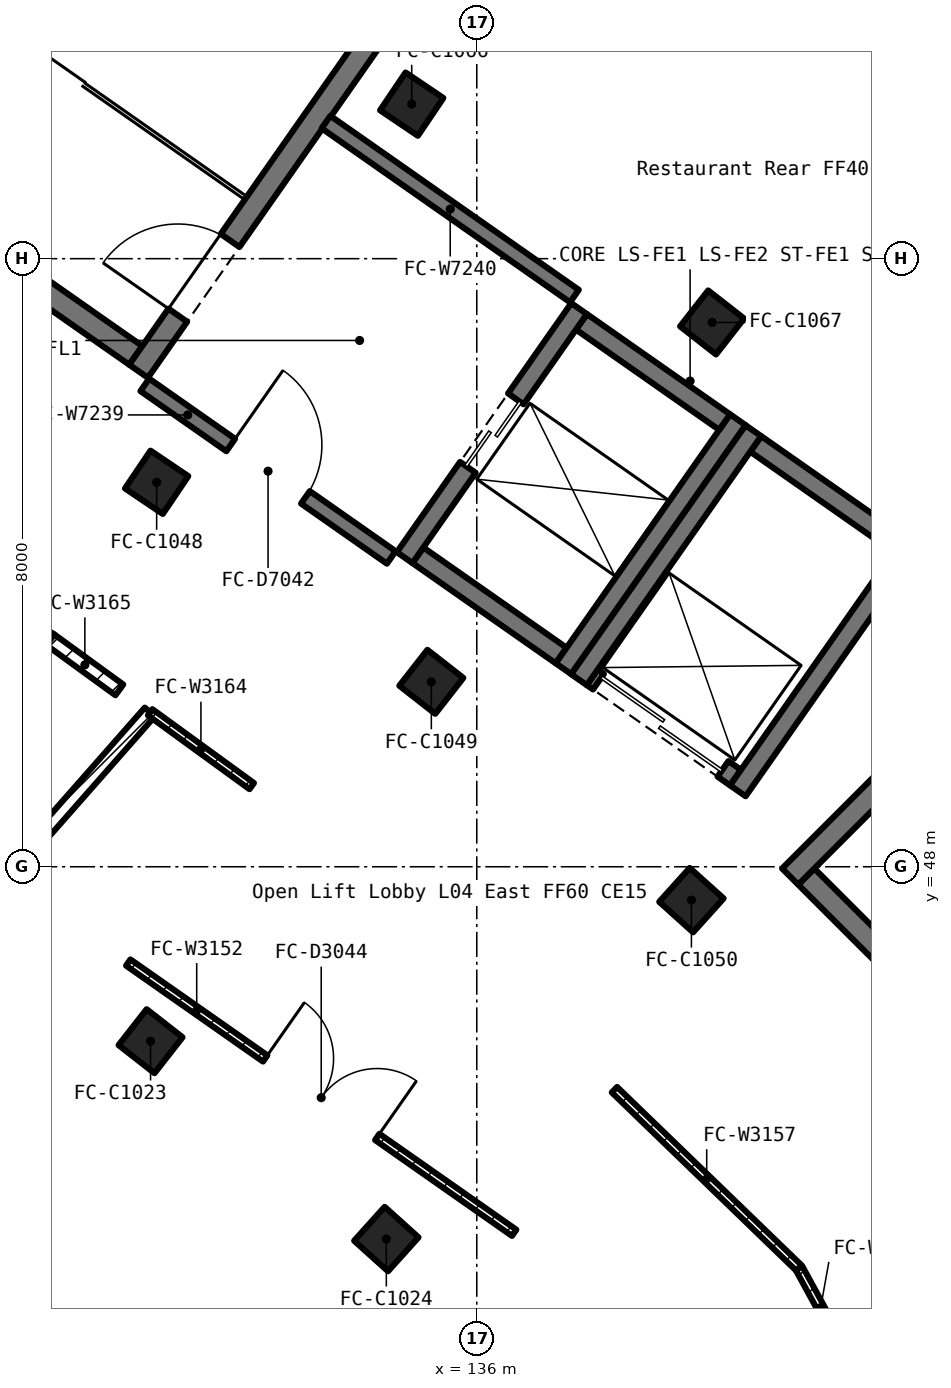
"""IFC4 building model, lengths in metres.
Left out: names, types, materials, properties, quantities, classifications, styles, units other than length and angle.
Written with IfcOpenShell. Run it as: python <this file> out.ifc"""

import sys

from ifc_helpers import new_model, si_unit, direction, frame, frame_2d, origin, origin_2d, place, context, subcontext, project, spatial, rectangle, extrude, element, fill, save


model = new_model("IFC4")
c1 = context("Model", 3, precision=1e-05, world=origin(), true_north=direction((0.0, 1.0)))
c2 = subcontext(c1, "Body", "Model", "MODEL_VIEW")
j1 = project(units=[si_unit("LENGTHUNIT", "METRE"), si_unit("PLANEANGLEUNIT", "RADIAN")], contexts=[c1])
p1 = place(None, origin())
s1 = spatial("IfcSite", under=j1, at=p1, CompositionType="ELEMENT")
p2 = place(p1, origin())
s2 = spatial("IfcBuilding", under=s1, at=p2, CompositionType="ELEMENT")
p3 = place(p2, frame((0.0, 0.0, 22.5)))
s3 = spatial("IfcBuildingStorey", under=s2, at=p3, CompositionType="ELEMENT", Elevation=22.5)
for number, where, z_axis, x_axis in (
    (1, (131.708, 45.705, 0.0), (0.0, 0.0, 1.0), (0.788, -0.616, 0.0)),
    (2, (134.81, 43.102, 0.0), (0.0, 0.0, 1.0), (0.743, -0.669, 0.0)),
    (3, (131.788, 53.058, 0.0), (0.0, 0.0, 1.0), (0.829, -0.559, 0.0)),
    (4, (135.402, 50.433, 0.0), (0.0, 0.0, 1.0), (0.788, -0.616, 0.0)),
    (5, (138.824, 47.561, 0.0), (0.0, 0.0, 1.0), (0.743, -0.669, 0.0)),
    (6, (135.144, 58.033, 0.0), (0.0, 0.0, 1.0), (0.829, -0.559, 0.0)),
    (7, (139.096, 55.161, 0.0), (0.0, 0.0, 1.0), (0.788, -0.616, 0.0)),
):
    element("IfcColumn", number, at=place(p3, frame(where, z_axis=z_axis, x_axis=x_axis)), inside=s3, PredefinedType="COLUMN", context=c2, shape_type="SweptSolid", body=[
        extrude(rectangle(XDim=0.6, YDim=0.6, at=origin_2d()), origin(), (0.0, 0.0, 1.0), 5.5),
    ])
p4 = place(p3, frame((127.418, 57.596, 0.0), z_axis=(0.0, 0.0, 1.0), x_axis=(0.819096538389, -0.573655698829, 0.0)))
e8 = element("IfcWall", 8, at=p4, inside=s3, PredefinedType="SOLIDWALL", context=c2, shape_type="SweptSolid", body=[
    extrude(rectangle(XDim=4.999, YDim=0.3, at=frame_2d((2.5, 0.0))), origin(), (0.0, 0.0, 1.0), 5.25),
])
p5 = place(p3, frame((131.55, 54.519, 0.0), z_axis=(0.0, 0.0, 1.0), x_axis=(0.573563925118, 0.819160804606, 0.0)))
e9 = element("IfcWall", 9, at=p5, inside=s3, PredefinedType="SOLIDWALL", context=c2, shape_type="SweptSolid", body=[
    extrude(rectangle(XDim=10.0, YDim=0.3, at=frame_2d((5.0, 0.0))), origin(), (0.0, 0.0, 1.0), 5.25),
])
p6 = place(p5, frame((0.9, 0.0, 0.0)))
e10 = element("IfcOpeningElement", 10, at=p6, cuts=e9, PredefinedType="OPENING", context=c2, shape_type="SweptSolid", body=[
    extrude(rectangle(XDim=1.2, YDim=2.1, at=frame_2d((0.6, 1.05))), frame((0.0, 0.162, 0.0), z_axis=(0.0, -1.0, 0.0), x_axis=(1.0, 0.0, 0.0)), (0.0, 0.0, 1.0), 0.324),
])
p7 = place(p3, frame((132.944, 65.751, 0.0), z_axis=(0.0, 0.0, 1.0), x_axis=(-0.573514776444, -0.819195215563, 0.0)))
e11 = element("IfcWall", 11, at=p7, inside=s3, PredefinedType="SOLIDWALL", context=c2, shape_type="SweptSolid", body=[
    extrude(rectangle(XDim=10.0, YDim=0.3, at=frame_2d((5.0, 0.0))), origin(), (0.0, 0.0, 1.0), 5.25),
])
p8 = place(p3, frame((140.335, 47.871, 0.0), z_axis=(0.0, 0.0, 1.0), x_axis=(0.707106781187, -0.707106781187, 0.0)))
e12 = element("IfcWall", 12, at=p8, inside=s3, PredefinedType="SOLIDWALL", context=c2, shape_type="SweptSolid", body=[
    extrude(rectangle(XDim=5.001, YDim=0.3, at=frame_2d((2.5, 0.0))), origin(), (0.0, 0.0, 1.0), 5.25),
])
p9 = place(p8, frame((1.9, 0.0, 0.0)))
e13 = element("IfcOpeningElement", 13, at=p9, cuts=e12, PredefinedType="OPENING", context=c2, shape_type="SweptSolid", body=[
    extrude(rectangle(XDim=1.2, YDim=2.1, at=frame_2d((0.6, 1.05))), frame((0.0, 0.162, 0.0), z_axis=(0.0, -1.0, 0.0), x_axis=(1.0, 0.0, 0.0)), (0.0, 0.0, 1.0), 0.324),
])
p10 = place(p3, frame((147.194, 54.942, 0.0), z_axis=(0.0, 0.0, 1.0), x_axis=(-0.707118988363, -0.7070945738, 0.0)))
e14 = element("IfcWall", 14, at=p10, inside=s3, PredefinedType="SOLIDWALL", context=c2, shape_type="SweptSolid", body=[
    extrude(rectangle(XDim=10.0, YDim=0.3, at=frame_2d((5.0, 0.0))), origin(), (0.0, 0.0, 1.0), 5.25),
])
p11 = place(p3, frame((135.225, 52.098, 0.0), z_axis=(0.0, 0.0, 1.0), x_axis=(0.819366508838, -0.573270027295, 0.0)))
e15 = element("IfcWall", 15, at=p11, inside=s3, PredefinedType="SOLIDWALL", context=c2, shape_type="SweptSolid", body=[
    extrude(rectangle(XDim=2.301, YDim=0.25, at=frame_2d((1.15, 0.0))), origin(), (0.0, 0.0, 1.0), 5.25),
])
p12 = place(p3, frame((137.141, 50.605, 0.0), z_axis=(0.0, 0.0, 1.0), x_axis=(0.573572956461, 0.819154480923, 0.0)))
e16 = element("IfcWall", 16, at=p12, inside=s3, PredefinedType="SOLIDWALL", context=c2, shape_type="SweptSolid", body=[
    extrude(rectangle(XDim=4.0, YDim=0.25, at=frame_2d((2.0, 0.0))), origin(), (0.0, 0.0, 1.0), 5.25),
])
p13 = place(p3, frame((139.261, 53.85, 0.0), z_axis=(0.0, 0.0, 1.0), x_axis=(-0.819226933165, 0.573469469089, 0.0)))
e17 = element("IfcWall", 17, at=p13, inside=s3, PredefinedType="SOLIDWALL", context=c2, shape_type="SweptSolid", body=[
    extrude(rectangle(XDim=2.3, YDim=0.25, at=frame_2d((1.15, 0.0))), origin(), (0.0, 0.0, 1.0), 5.25),
])
p14 = place(p3, frame((137.346, 55.343, 0.0), z_axis=(0.0, 0.0, 1.0), x_axis=(-0.573736768582, -0.819039755065, 0.0)))
e18 = element("IfcWall", 18, at=p14, inside=s3, PredefinedType="SOLIDWALL", context=c2, shape_type="SweptSolid", body=[
    extrude(rectangle(XDim=4.0, YDim=0.25, at=frame_2d((2.0, 0.0))), origin(), (0.0, 0.0, 1.0), 5.25),
])
p15 = place(p14, frame((1.45, 0.0, 0.0)))
e19 = element("IfcOpeningElement", 19, at=p15, cuts=e18, PredefinedType="OPENING", context=c2, shape_type="SweptSolid", body=[
    extrude(rectangle(XDim=1.1, YDim=2.1, at=frame_2d((0.55, 1.05))), frame((0.0, 0.137, 0.0), z_axis=(0.0, -1.0, 0.0), x_axis=(1.0, 0.0, 0.0)), (0.0, 0.0, 1.0), 0.274),
])
p16 = place(p3, frame((137.519, 50.492, 0.0), z_axis=(0.0, 0.0, 1.0), x_axis=(0.819366508838, -0.573270027295, 0.0)))
e20 = element("IfcWall", 20, at=p16, inside=s3, PredefinedType="SOLIDWALL", context=c2, shape_type="SweptSolid", body=[
    extrude(rectangle(XDim=2.301, YDim=0.25, at=frame_2d((1.15, 0.0))), origin(), (0.0, 0.0, 1.0), 5.25),
])
p17 = place(p16, frame((0.1, 0.0, 0.0)))
e21 = element("IfcOpeningElement", 21, at=p17, cuts=e20, PredefinedType="OPENING", context=c2, shape_type="SweptSolid", body=[
    extrude(rectangle(XDim=2.0, YDim=2.2, at=frame_2d((1.0, 1.1))), frame((0.0, 0.137, 0.0), z_axis=(0.0, -1.0, 0.0), x_axis=(1.0, 0.0, 0.0)), (0.0, 0.0, 1.0), 0.274),
])
p18 = place(p3, frame((139.435, 48.999, 0.0), z_axis=(0.0, 0.0, 1.0), x_axis=(0.57360163893, 0.819134396675, 0.0)))
e22 = element("IfcWall", 22, at=p18, inside=s3, PredefinedType="SOLIDWALL", context=c2, shape_type="SweptSolid", body=[
    extrude(rectangle(XDim=3.999, YDim=0.25, at=frame_2d((2.0, 0.0))), origin(), (0.0, 0.0, 1.0), 5.25),
])
p19 = place(p3, frame((141.555, 52.244, 0.0), z_axis=(0.0, 0.0, 1.0), x_axis=(-0.819316661421, 0.57334126689, 0.0)))
e23 = element("IfcWall", 23, at=p19, inside=s3, PredefinedType="SOLIDWALL", context=c2, shape_type="SweptSolid", body=[
    extrude(rectangle(XDim=2.301, YDim=0.25, at=frame_2d((1.15, 0.0))), origin(), (0.0, 0.0, 1.0), 5.25),
])
p20 = place(p3, frame((139.639, 53.737, 0.0), z_axis=(0.0, 0.0, 1.0), x_axis=(-0.573572956461, -0.819154480923, 0.0)))
e24 = element("IfcWall", 24, at=p20, inside=s3, PredefinedType="SOLIDWALL", context=c2, shape_type="SweptSolid", body=[
    extrude(rectangle(XDim=4.0, YDim=0.25, at=frame_2d((2.0, 0.0))), origin(), (0.0, 0.0, 1.0), 5.25),
])
p21 = place(p3, frame((131.632, 54.34, 0.0), z_axis=(0.0, 0.0, 1.0), x_axis=(0.81911891796, -0.573623742744, 0.0)))
e25 = element("IfcWall", 25, at=p21, inside=s3, PredefinedType="PARTITIONING", context=c2, shape_type="SweptSolid", body=[
    extrude(rectangle(XDim=3.959, YDim=0.2, at=frame_2d((1.979, 0.0))), origin(), (0.0, 0.0, 1.0), 5.25),
])
p22 = place(p21, frame((1.38, 0.0, 0.0)))
e26 = element("IfcOpeningElement", 26, at=p22, cuts=e25, PredefinedType="OPENING", context=c2, shape_type="SweptSolid", body=[
    extrude(rectangle(XDim=1.2, YDim=2.1, at=frame_2d((0.6, 1.05))), frame((0.0, 0.112, 0.0), z_axis=(0.0, -1.0, 0.0), x_axis=(1.0, 0.0, 0.0)), (0.0, 0.0, 1.0), 0.224),
])
p23 = place(p3, frame((137.285, 55.508, 0.0), z_axis=(0.0, 0.0, 1.0), x_axis=(-0.819125561737, 0.573614255497, 0.0)))
e27 = element("IfcWall", 27, at=p23, inside=s3, PredefinedType="PARTITIONING", context=c2, shape_type="SweptSolid", body=[
    extrude(rectangle(XDim=3.99, YDim=0.2, at=frame_2d((1.995, 0.0))), origin(), (0.0, 0.0, 1.0), 5.25),
])
p24 = place(p3, frame((125.697, 43.217, 0.0), z_axis=(0.0, 0.0, 1.0), x_axis=(0.660652130462, 0.750692188927, 0.0)))
e28 = element("IfcWall", 28, at=p24, inside=s3, PredefinedType="PARTITIONING", context=c2, shape_type="SweptSolid", body=[
    extrude(rectangle(XDim=9.083, YDim=0.175, at=frame_2d((4.542, 0.0))), origin(), (0.0, 0.0, 1.0), 4.35),
])
p25 = place(p3, frame((131.414, 46.74, 0.0), z_axis=(0.0, 0.0, 1.0), x_axis=(0.81912644488, -0.573612994359, 0.0)))
e29 = element("IfcWall", 29, at=p25, inside=s3, PredefinedType="PARTITIONING", context=c2, shape_type="SweptSolid", body=[
    extrude(rectangle(XDim=6.199, YDim=0.1, at=frame_2d((3.1, 0.0))), origin(), (0.0, 0.0, 1.0), 4.35),
])
p26 = place(p25, frame((2.2, 0.0, 0.0)))
e30 = element("IfcOpeningElement", 30, at=p26, cuts=e29, PredefinedType="OPENING", context=c2, shape_type="SweptSolid", body=[
    extrude(rectangle(XDim=1.8, YDim=2.1, at=frame_2d((0.9, 1.05))), frame((0.0, 0.062, 0.0), z_axis=(0.0, -1.0, 0.0), x_axis=(1.0, 0.0, 0.0)), (0.0, 0.0, 1.0), 0.124),
])
p27 = place(p3, frame((130.39, 50.986, 0.0), z_axis=(0.0, 0.0, 1.0), x_axis=(-0.848001499411, 0.52999382732, 0.0)))
e31 = element("IfcWall", 31, at=p27, inside=s3, PredefinedType="PARTITIONING", context=c2, shape_type="SweptSolid", body=[
    extrude(rectangle(XDim=4.292, YDim=0.175, at=frame_2d((2.146, 0.0))), origin(), (0.0, 0.0, 1.0), 4.35),
])
p28 = place(p27, frame((1.646, 0.0, 0.0)))
e32 = element("IfcOpeningElement", 32, at=p28, cuts=e31, PredefinedType="OPENING", context=c2, shape_type="SweptSolid", body=[
    extrude(rectangle(XDim=1.0, YDim=2.1, at=frame_2d((0.5, 1.05))), frame((0.0, 0.1, 0.0), z_axis=(0.0, -1.0, 0.0), x_axis=(1.0, 0.0, 0.0)), (0.0, 0.0, 1.0), 0.199),
])
p29 = place(p3, frame((140.239, 42.721, 0.0), z_axis=(0.0, 0.0, 1.0), x_axis=(0.479690824027, -0.877437583731, 0.0)))
e33 = element("IfcWall", 33, at=p29, inside=s3, PredefinedType="PARTITIONING", context=c2, shape_type="SweptSolid", body=[
    extrude(rectangle(XDim=3.915, YDim=0.1, at=frame_2d((1.958, 0.0))), origin(), (0.0, 0.0, 1.0), 4.35),
])
p30 = place(p29, frame((1.189, 0.0, 0.0)))
e34 = element("IfcOpeningElement", 34, at=p30, cuts=e33, PredefinedType="OPENING", context=c2, shape_type="SweptSolid", body=[
    extrude(rectangle(XDim=1.8, YDim=2.1, at=frame_2d((0.9, 1.05))), frame((0.0, 0.062, 0.0), z_axis=(0.0, -1.0, 0.0), x_axis=(1.0, 0.0, 0.0)), (0.0, 0.0, 1.0), 0.124),
])
p31 = place(p3, frame((137.811, 45.067, 0.0), z_axis=(0.0, 0.0, 1.0), x_axis=(0.719150966755, -0.694853860186, 0.0)))
e35 = element("IfcWall", 35, at=p31, inside=s3, PredefinedType="PARTITIONING", context=c2, shape_type="SweptSolid", body=[
    extrude(rectangle(XDim=3.376, YDim=0.1, at=frame_2d((1.688, 0.0))), origin(), (0.0, 0.0, 1.0), 4.35),
])
p32 = place(p3, frame((131.702, 50.033, 0.0), z_axis=(0.0, 0.0, 1.0), x_axis=(0.808895718894, -0.587952137469, 0.0)))
e36 = element("IfcWall", 36, at=p32, inside=s3, PredefinedType="PARTITIONING", context=c2, shape_type="SweptSolid", body=[
    extrude(rectangle(XDim=1.653, YDim=0.1, at=frame_2d((0.827, 0.0))), origin(), (0.0, 0.0, 1.0), 4.35),
])
p33 = place(p3, frame((131.297, 50.327, 0.0), z_axis=(0.0, 0.0, 1.0), x_axis=(-0.8089996052, 0.587809185694, 0.0)))
e37 = element("IfcWall", 37, at=p33, inside=s3, PredefinedType="PARTITIONING", context=c2, shape_type="SweptSolid", body=[
    extrude(rectangle(XDim=1.121, YDim=0.175, at=frame_2d((0.561, 0.0))), origin(), (0.0, 0.0, 1.0), 4.35),
])
p34 = place(p6, origin())
e38 = element("IfcDoor", 38, at=p34, inside=s3, OperationType="SINGLE_SWING_LEFT", PredefinedType="DOOR", context=c2, shape_type="SweptSolid", body=[
    extrude(rectangle(XDim=1.2, YDim=2.1, at=frame_2d((0.6, 1.05))), frame((0.0, 0.025, 0.0), z_axis=(0.0, -1.0, 0.0), x_axis=(1.0, 0.0, 0.0)), (0.0, 0.0, 1.0), 0.05),
])
fill(e10, e38)
p35 = place(p15, origin())
e39 = element("IfcDoor", 39, at=p35, inside=s3, OperationType="DOUBLE_DOOR_SLIDING", PredefinedType="DOOR", context=c2, shape_type="SweptSolid", body=[
    extrude(rectangle(XDim=1.1, YDim=2.1, at=frame_2d((0.55, 1.05))), frame((0.0, 0.025, 0.0), z_axis=(0.0, -1.0, 0.0), x_axis=(1.0, 0.0, 0.0)), (0.0, 0.0, 1.0), 0.05),
])
fill(e19, e39)
p36 = place(p17, origin())
e40 = element("IfcDoor", 40, at=p36, inside=s3, OperationType="DOUBLE_DOOR_SLIDING", PredefinedType="DOOR", context=c2, shape_type="SweptSolid", body=[
    extrude(rectangle(XDim=2.0, YDim=2.2, at=frame_2d((1.0, 1.1))), frame((0.0, 0.025, 0.0), z_axis=(0.0, -1.0, 0.0), x_axis=(1.0, 0.0, 0.0)), (0.0, 0.0, 1.0), 0.05),
])
fill(e21, e40)
p37 = place(p22, origin())
e41 = element("IfcDoor", 41, at=p37, inside=s3, OperationType="SINGLE_SWING_LEFT", PredefinedType="DOOR", context=c2, shape_type="SweptSolid", body=[
    extrude(rectangle(XDim=1.2, YDim=2.1, at=frame_2d((0.6, 1.05))), frame((0.0, 0.025, 0.0), z_axis=(0.0, -1.0, 0.0), x_axis=(1.0, 0.0, 0.0)), (0.0, 0.0, 1.0), 0.05),
])
fill(e26, e41)
p38 = place(p26, origin())
e42 = element("IfcDoor", 42, at=p38, inside=s3, OperationType="DOUBLE_DOOR_SINGLE_SWING", PredefinedType="DOOR", context=c2, shape_type="SweptSolid", body=[
    extrude(rectangle(XDim=1.8, YDim=2.1, at=frame_2d((0.9, 1.05))), frame((0.0, 0.025, 0.0), z_axis=(0.0, -1.0, 0.0), x_axis=(1.0, 0.0, 0.0)), (0.0, 0.0, 1.0), 0.05),
])
fill(e30, e42)
save(model, sys.argv[1])
